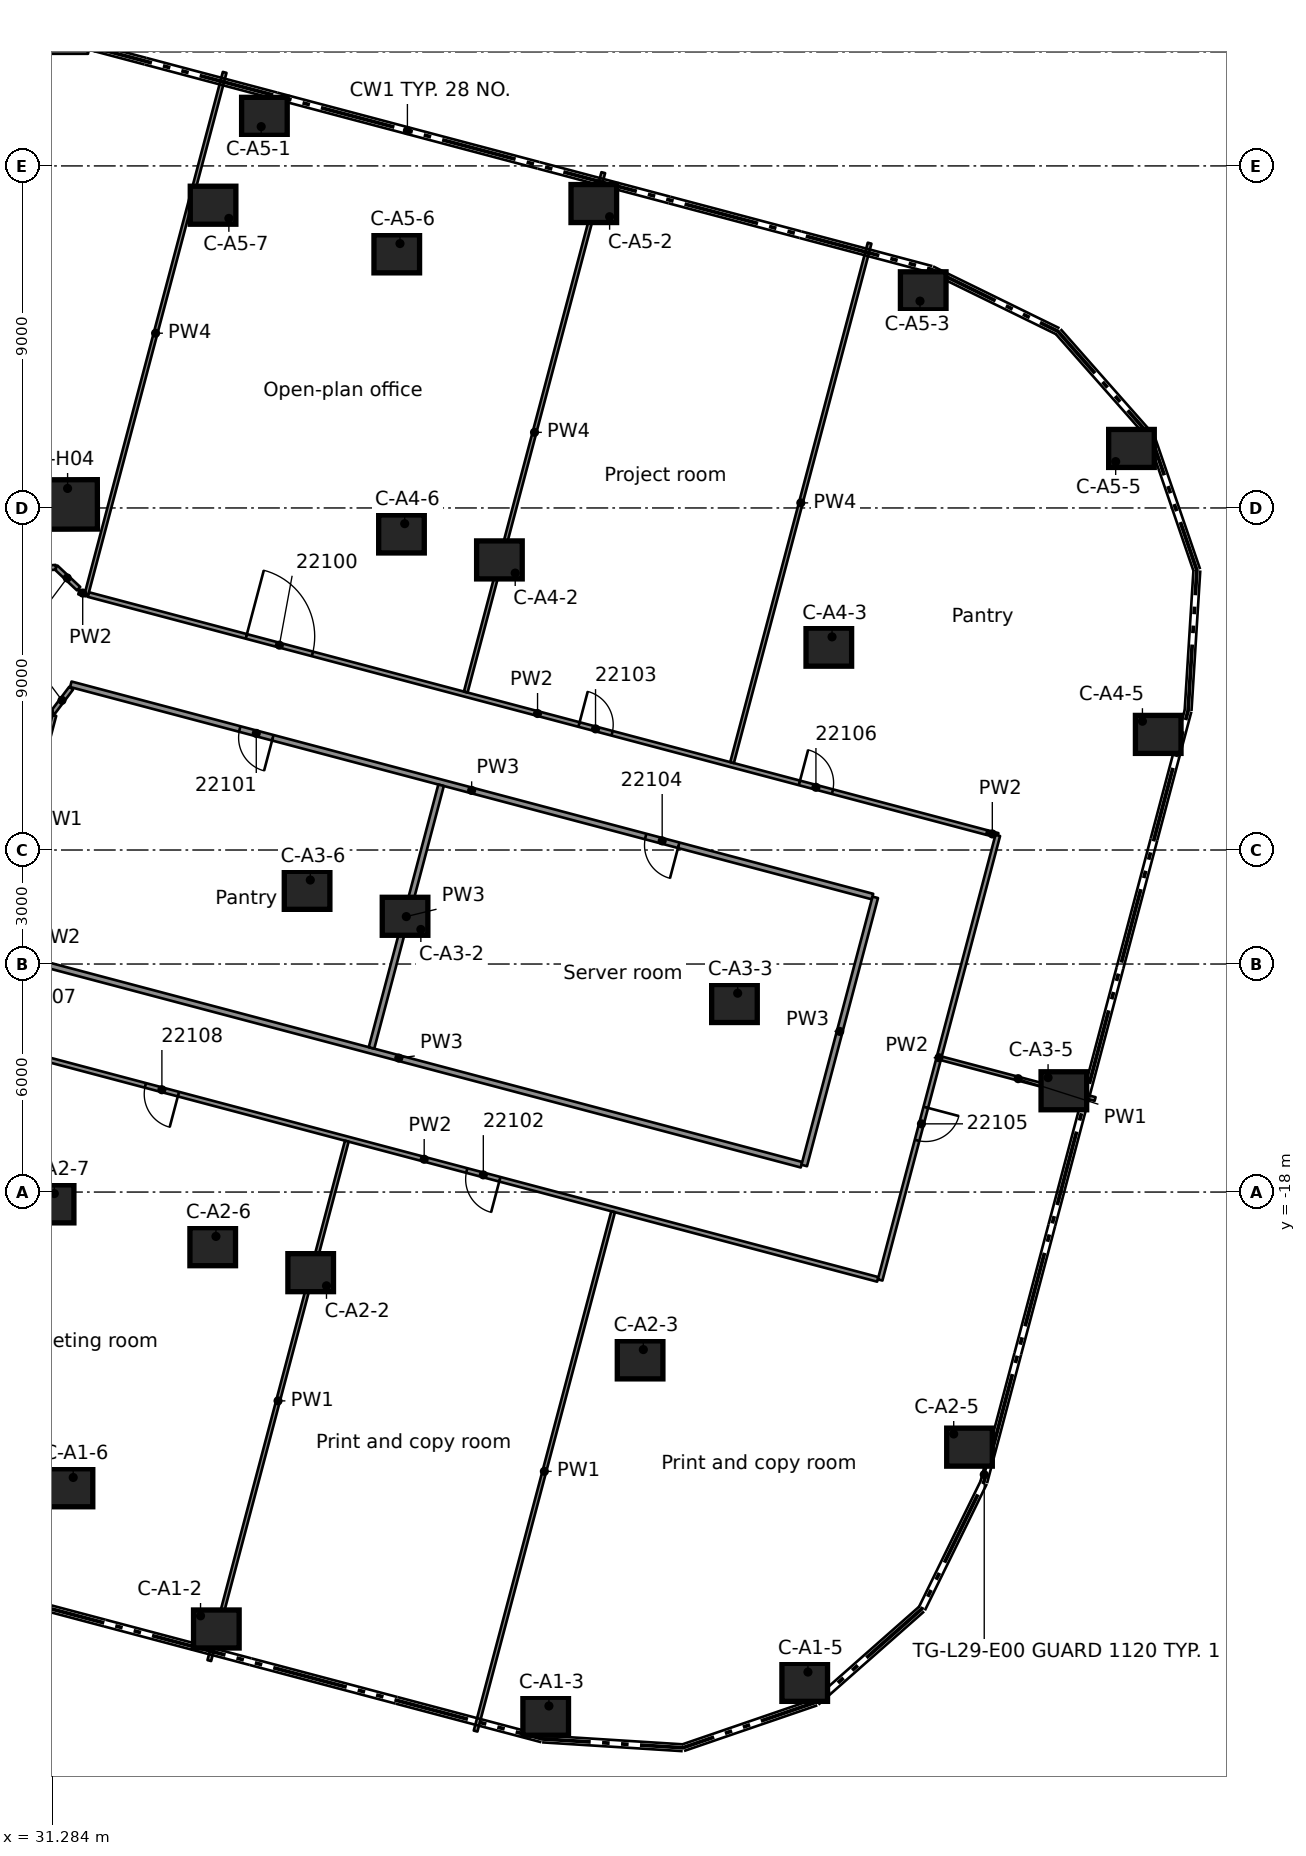
"""IFC4 building model, lengths in metres.
Left out: names, types, materials, properties, quantities, classifications, styles, units other than length and angle.
Written with IfcOpenShell. Run it as: python <this file> out.ifc"""

import sys

from ifc_helpers import new_model, si_unit, direction, frame, frame_2d, origin, origin_2d, place, context, subcontext, project, spatial, rectangle, extrude, element, fill, save


model = new_model("IFC4")
c1 = context("Model", 3, precision=1e-05, world=origin(), true_north=direction((0.0, 1.0)))
c2 = subcontext(c1, "Body", "Model", "MODEL_VIEW")
j1 = project(units=[si_unit("LENGTHUNIT", "METRE"), si_unit("PLANEANGLEUNIT", "RADIAN")], contexts=[c1])
p1 = place(None, origin())
s1 = spatial("IfcSite", under=j1, at=p1, CompositionType="ELEMENT")
p2 = place(p1, origin())
s2 = spatial("IfcBuilding", under=s1, at=p2, CompositionType="ELEMENT")
p3 = place(p2, frame((0.0, 0.0, 116.2)))
s3 = spatial("IfcBuildingStorey", under=s2, at=p3, CompositionType="ELEMENT", Elevation=116.2)
for number, where, z_axis, x_axis in (
    (1, (35.602, -29.497, 0.0), (0.0, 0.0, 1.0), (1.0, 0.0, 0.0)),
    (2, (44.269, -31.793, 0.0), (0.0, 0.0, 1.0), (1.0, 0.0, 0.0)),
    (3, (51.085, -30.901, 0.0), (0.0, 0.0, 1.0), (1.0, 0.0, 0.0)),
    (4, (31.751, -25.781, 0.0), (0.0, 0.0, 1.0), (1.0, 0.0, 0.0)),
    (5, (38.085, -20.121, 0.0), (0.0, 0.0, 1.0), (1.0, 0.0, 0.0)),
    (6, (46.753, -22.416, 0.0), (0.0, 0.0, 1.0), (1.0, 0.0, 0.0)),
    (7, (55.421, -24.712, 0.0), (0.0, 0.0, 1.0), (1.0, 0.0, 0.0)),
    (8, (35.507, -19.438, 0.0), (0.0, 0.0, 1.0), (1.0, 0.0, 0.0)),
    (9, (31.254, -18.311, 0.0), (0.0, 0.0, 1.0), (1.0, 0.0, 0.0)),
    (10, (40.568, -10.744, 0.0), (0.0, 0.0, 1.0), (1.0, 0.0, 0.0)),
    (11, (49.236, -13.039, 0.0), (0.0, 0.0, 1.0), (1.0, 0.0, 0.0)),
    (12, (57.904, -15.335, 0.0), (0.0, 0.0, 1.0), (1.0, 0.0, 0.0)),
    (13, (37.99, -10.061, 0.0), (0.0, 0.0, 1.0), (1.0, 0.0, 0.0)),
    (14, (43.051, -1.367, 0.0), (0.0, 0.0, 1.0), (1.0, 0.0, 0.0)),
    (15, (51.719, -3.663, 0.0), (0.0, 0.0, 1.0), (1.0, 0.0, 0.0)),
    (16, (60.387, -5.958, 0.0), (0.0, 0.0, 1.0), (1.0, 0.0, 0.0)),
    (17, (40.474, -0.684, 0.0), (0.0, 0.0, 1.0), (1.0, 0.0, 0.0)),
    (18, (36.867, 10.305, 0.0), (0.0, 0.0, 1.0), (1.0, 0.0, 0.0)),
    (19, (45.535, 8.01, 0.0), (0.0, 0.0, 1.0), (1.0, 0.0, 0.0)),
    (20, (54.203, 5.714, 0.0), (0.0, 0.0, 1.0), (1.0, 0.0, 0.0)),
    (21, (59.683, 1.566, 0.0), (0.0, 0.0, 1.0), (1.0, 0.0, 0.0)),
    (22, (40.35, 6.686, 0.0), (0.0, 0.0, 1.0), (1.0, 0.0, 0.0)),
    (23, (35.516, 7.966, 0.0), (0.0, 0.0, 1.0), (1.0, 0.0, 0.0)),
):
    element("IfcColumn", number, at=place(p3, frame(where, z_axis=z_axis, x_axis=x_axis)), inside=s3, PredefinedType="COLUMN", context=c2, shape_type="SweptSolid", body=[
        extrude(rectangle(XDim=1.2, YDim=1.0, at=origin_2d()), origin(), (0.0, 0.0, 1.0), 3.5),
    ])
p4 = place(p3, frame((31.822, 0.093, 0.0), z_axis=(0.0, 0.0, 1.0), x_axis=(0.999995752265, 0.002914695724, 0.0)))
e24 = element("IfcColumn", 24, at=p4, inside=s3, PredefinedType="COLUMN", context=c2, shape_type="SweptSolid", body=[
    extrude(rectangle(XDim=1.3, YDim=1.3, at=origin_2d()), origin(), (0.0, 0.0, 1.0), 3.5),
])
p5 = place(p3, frame((31.782, -4.741, 0.0), z_axis=(0.0, 0.0, 1.0), x_axis=(-0.601653415527, -0.798757264496, 0.0)))
e25 = element("IfcWall", 25, at=p5, inside=s3, PredefinedType="PARTITIONING", context=c2, shape_type="SweptSolid", body=[
    extrude(rectangle(XDim=0.803, YDim=0.125, at=frame_2d((0.401, 0.0))), origin(), (0.0, 0.0, 1.0), 3.08),
])
p6 = place(p3, frame((31.378, -1.56, 0.0), z_axis=(0.0, 0.0, 1.0), x_axis=(0.728704597213, -0.684828160928, 0.0)))
e26 = element("IfcWall", 26, at=p6, inside=s3, PredefinedType="PARTITIONING", context=c2, shape_type="SweptSolid", body=[
    extrude(rectangle(XDim=0.823, YDim=0.125, at=frame_2d((0.412, 0.0))), origin(), (0.0, 0.0, 1.0), 3.08),
])
p7 = place(p3, frame((55.876, -8.539, 0.0), z_axis=(0.0, 0.0, 1.0), x_axis=(0.966598588757, -0.256295080352, 0.0)))
e27 = element("IfcWall", 27, at=p7, inside=s3, PredefinedType="PARTITIONING", context=c2, shape_type="SweptSolid", body=[
    extrude(rectangle(XDim=0.3, YDim=0.125, at=frame_2d((0.15, 0.0))), origin(), (0.0, 0.0, 1.0), 3.08),
])
p8 = place(p3, frame((53.007, -20.298, 0.0), z_axis=(0.0, 0.0, 1.0), x_axis=(-0.966663351112, 0.256050709074, 0.0)))
e28 = element("IfcWall", 28, at=p8, inside=s3, PredefinedType="PARTITIONING", context=c2, shape_type="SweptSolid", body=[
    extrude(rectangle(XDim=24.694, YDim=0.125, at=frame_2d((12.347, 0.0))), origin(), (0.0, 0.0, 1.0), 3.08),
])
p9 = place(p8, frame((10.288, 0.0, 0.0)))
e29 = element("IfcOpeningElement", 29, at=p9, cuts=e28, PredefinedType="OPENING", context=c2, shape_type="SweptSolid", body=[
    extrude(rectangle(XDim=0.9, YDim=2.1, at=frame_2d((0.45, 1.05))), frame((0.0, 0.073, 0.0), z_axis=(0.0, -1.0, 0.0), x_axis=(1.0, 0.0, 0.0)), (0.0, 0.0, 1.0), 0.145),
])
p10 = place(p8, frame((23.037, 0.0, 0.0)))
e30 = element("IfcOpeningElement", 30, at=p10, cuts=e28, PredefinedType="OPENING", context=c2, shape_type="SweptSolid", body=[
    extrude(rectangle(XDim=0.9, YDim=2.1, at=frame_2d((0.45, 1.05))), frame((0.0, 0.073, 0.0), z_axis=(0.0, -1.0, 0.0), x_axis=(1.0, 0.0, 0.0)), (0.0, 0.0, 1.0), 0.145),
])
p11 = place(p8, frame((19.037, 0.0, 0.0)))
e31 = element("IfcOpeningElement", 31, at=p11, cuts=e28, PredefinedType="OPENING", context=c2, shape_type="SweptSolid", body=[
    extrude(rectangle(XDim=0.9, YDim=2.1, at=frame_2d((0.45, 1.05))), frame((0.0, 0.073, 0.0), z_axis=(0.0, -1.0, 0.0), x_axis=(1.0, 0.0, 0.0)), (0.0, 0.0, 1.0), 0.145),
])
p12 = place(p3, frame((29.806, -11.669, 0.0), z_axis=(0.0, 0.0, 1.0), x_axis=(0.966684240893, -0.255971831282, 0.0)))
e32 = element("IfcWall", 32, at=p12, inside=s3, PredefinedType="PARTITIONING", context=c2, shape_type="SweptSolid", body=[
    extrude(rectangle(XDim=21.925, YDim=0.15, at=frame_2d((10.962, 0.0))), origin(), (0.0, 0.0, 1.0), 3.08),
])
p13 = place(p3, frame((54.677, -14.481, 0.0), z_axis=(0.0, 0.0, 1.0), x_axis=(0.966750591727, -0.255721124263, 0.0)))
e33 = element("IfcWall", 33, at=p13, inside=s3, PredefinedType="PARTITIONING", context=c2, shape_type="SweptSolid", body=[
    extrude(rectangle(XDim=4.188, YDim=0.1, at=frame_2d((2.094, 0.0))), origin(), (0.0, 0.0, 1.0), 3.08),
])
p14 = place(p3, frame((52.868, -10.225, 0.0), z_axis=(0.0, 0.0, 1.0), x_axis=(-0.966680071038, 0.255987578328, 0.0)))
e34 = element("IfcWall", 34, at=p14, inside=s3, PredefinedType="PARTITIONING", context=c2, shape_type="SweptSolid", body=[
    extrude(rectangle(XDim=21.822, YDim=0.15, at=frame_2d((10.911, 0.0))), origin(), (0.0, 0.0, 1.0), 3.08),
])
p15 = place(p14, frame((16.324, 0.0, 0.0)))
e35 = element("IfcOpeningElement", 35, at=p15, cuts=e34, PredefinedType="OPENING", context=c2, shape_type="SweptSolid", body=[
    extrude(rectangle(XDim=0.9, YDim=2.1, at=frame_2d((0.45, 1.05))), frame((0.0, 0.085, 0.0), z_axis=(0.0, -1.0, 0.0), x_axis=(1.0, 0.0, 0.0)), (0.0, 0.0, 1.0), 0.17),
])
p16 = place(p14, frame((5.275, 0.0, 0.0)))
e36 = element("IfcOpeningElement", 36, at=p16, cuts=e34, PredefinedType="OPENING", context=c2, shape_type="SweptSolid", body=[
    extrude(rectangle(XDim=0.9, YDim=2.1, at=frame_2d((0.45, 1.05))), frame((0.0, 0.085, 0.0), z_axis=(0.0, -1.0, 0.0), x_axis=(1.0, 0.0, 0.0)), (0.0, 0.0, 1.0), 0.17),
])
p17 = place(p3, frame((31.985, -2.212, 0.0), z_axis=(0.0, 0.0, 1.0), x_axis=(0.966952674041, -0.25495592985, 0.0)))
e37 = element("IfcWall", 37, at=p17, inside=s3, PredefinedType="PARTITIONING", context=c2, shape_type="SweptSolid", body=[
    extrude(rectangle(XDim=0.208, YDim=0.125, at=frame_2d((0.104, 0.0))), origin(), (0.0, 0.0, 1.0), 3.08),
])
p18 = place(p3, frame((32.234, -2.278, 0.0), z_axis=(0.0, 0.0, 1.0), x_axis=(0.966664542412, -0.256046211541, 0.0)))
e38 = element("IfcWall", 38, at=p18, inside=s3, PredefinedType="PARTITIONING", context=c2, shape_type="SweptSolid", body=[
    extrude(rectangle(XDim=24.456, YDim=0.125, at=frame_2d((12.228, 0.0))), origin(), (0.0, 0.0, 1.0), 3.08),
])
p19 = place(p18, frame((4.3, 0.0, 0.0)))
e39 = element("IfcOpeningElement", 39, at=p19, cuts=e38, PredefinedType="OPENING", context=c2, shape_type="SweptSolid", body=[
    extrude(rectangle(XDim=1.8, YDim=2.1, at=frame_2d((0.9, 1.05))), frame((0.0, 0.073, 0.0), z_axis=(0.0, -1.0, 0.0), x_axis=(1.0, 0.0, 0.0)), (0.0, 0.0, 1.0), 0.145),
])
p20 = place(p18, frame((13.357, 0.0, 0.0)))
e40 = element("IfcOpeningElement", 40, at=p20, cuts=e38, PredefinedType="OPENING", context=c2, shape_type="SweptSolid", body=[
    extrude(rectangle(XDim=0.9, YDim=2.1, at=frame_2d((0.45, 1.05))), frame((0.0, 0.073, 0.0), z_axis=(0.0, -1.0, 0.0), x_axis=(1.0, 0.0, 0.0)), (0.0, 0.0, 1.0), 0.145),
])
p21 = place(p18, frame((19.356, 0.0, 0.0)))
e41 = element("IfcOpeningElement", 41, at=p21, cuts=e38, PredefinedType="OPENING", context=c2, shape_type="SweptSolid", body=[
    extrude(rectangle(XDim=0.9, YDim=2.1, at=frame_2d((0.45, 1.05))), frame((0.0, 0.073, 0.0), z_axis=(0.0, -1.0, 0.0), x_axis=(1.0, 0.0, 0.0)), (0.0, 0.0, 1.0), 0.145),
])
p22 = place(p3, frame((22.713, 12.0, 0.0), z_axis=(0.0, 0.0, 1.0), x_axis=(1.0, 0.0, 0.0)))
e42 = element("IfcWall", 42, at=p22, inside=s3, PredefinedType="PARTITIONING", context=c2, shape_type="SweptSolid", body=[
    extrude(rectangle(XDim=9.513, YDim=0.1, at=frame_2d((4.757, 0.0))), origin(), (0.0, 0.0, 1.0), 3.08),
])
p23 = place(p3, frame((22.713, -6.111, 0.0), z_axis=(0.0, 0.0, 1.0), x_axis=(0.996414999207, 0.084599937093, 0.0)))
e43 = element("IfcWall", 43, at=p23, inside=s3, PredefinedType="PARTITIONING", context=c2, shape_type="SweptSolid", body=[
    extrude(rectangle(XDim=8.617, YDim=0.125, at=frame_2d((4.309, 0.0))), origin(), (0.0, 0.0, 1.0), 3.08),
])
p24 = place(p3, frame((25.223, -2.083, 0.0), z_axis=(0.0, 0.0, 1.0), x_axis=(0.996410075985, 0.084657902612, 0.0)))
e44 = element("IfcWall", 44, at=p24, inside=s3, PredefinedType="PARTITIONING", context=c2, shape_type="SweptSolid", body=[
    extrude(rectangle(XDim=6.177, YDim=0.125, at=frame_2d((3.089, 0.0))), origin(), (0.0, 0.0, 1.0), 3.08),
])
p25 = place(p3, frame((56.165, -8.616, 0.0), z_axis=(0.0, 0.0, 1.0), x_axis=(-0.255867603739, -0.966711833669, 0.0)))
e45 = element("IfcWall", 45, at=p25, inside=s3, PredefinedType="PARTITIONING", context=c2, shape_type="SweptSolid", body=[
    extrude(rectangle(XDim=12.1, YDim=0.125, at=frame_2d((6.05, 0.0))), origin(), (0.0, 0.0, 1.0), 3.08),
])
p26 = place(p25, frame((7.401, 0.0, 0.0)))
e46 = element("IfcOpeningElement", 46, at=p26, cuts=e45, PredefinedType="OPENING", context=c2, shape_type="SweptSolid", body=[
    extrude(rectangle(XDim=0.9, YDim=2.1, at=frame_2d((0.45, 1.05))), frame((0.0, 0.073, 0.0), z_axis=(0.0, -1.0, 0.0), x_axis=(1.0, 0.0, 0.0)), (0.0, 0.0, 1.0), 0.145),
])
p27 = place(p3, frame((51.072, -17.301, 0.0), z_axis=(0.0, 0.0, 1.0), x_axis=(0.256040569916, 0.966666036725, 0.0)))
e47 = element("IfcWall", 47, at=p27, inside=s3, PredefinedType="PARTITIONING", context=c2, shape_type="SweptSolid", body=[
    extrude(rectangle(XDim=7.299, YDim=0.15, at=frame_2d((3.65, 0.0))), origin(), (0.0, 0.0, 1.0), 3.08),
])
p28 = place(p3, frame((42.424, -32.183, 0.0), z_axis=(0.0, 0.0, 1.0), x_axis=(0.255986543434, 0.966680345089, 0.0)))
e48 = element("IfcWall", 48, at=p28, inside=s3, PredefinedType="PARTITIONING", context=c2, shape_type="SweptSolid", body=[
    extrude(rectangle(XDim=14.137, YDim=0.1, at=frame_2d((7.068, 0.0))), origin(), (0.0, 0.0, 1.0), 3.08),
])
p29 = place(p3, frame((49.173, -6.7, 0.0), z_axis=(0.0, 0.0, 1.0), x_axis=(0.25596945064, 0.966684871268, 0.0)))
e49 = element("IfcWall", 49, at=p29, inside=s3, PredefinedType="PARTITIONING", context=c2, shape_type="SweptSolid", body=[
    extrude(rectangle(XDim=14.138, YDim=0.1, at=frame_2d((7.069, 0.0))), origin(), (0.0, 0.0, 1.0), 2.445),
])
p30 = place(p3, frame((35.417, -30.328, 0.0), z_axis=(0.0, 0.0, 1.0), x_axis=(0.255904901066, 0.966701961108, 0.0)))
e50 = element("IfcWall", 50, at=p30, inside=s3, PredefinedType="PARTITIONING", context=c2, shape_type="SweptSolid", body=[
    extrude(rectangle(XDim=14.138, YDim=0.1, at=frame_2d((7.069, 0.0))), origin(), (0.0, 0.0, 1.0), 3.08),
])
p31 = place(p3, frame((39.685, -14.208, 0.0), z_axis=(0.0, 0.0, 1.0), x_axis=(0.256072738338, 0.966657515711, 0.0)))
e51 = element("IfcWall", 51, at=p31, inside=s3, PredefinedType="PARTITIONING", context=c2, shape_type="SweptSolid", body=[
    extrude(rectangle(XDim=7.151, YDim=0.15, at=frame_2d((3.575, 0.0))), origin(), (0.0, 0.0, 1.0), 3.08),
])
p32 = place(p3, frame((42.165, -4.844, 0.0), z_axis=(0.0, 0.0, 1.0), x_axis=(0.25596945064, 0.966684871268, 0.0)))
e52 = element("IfcWall", 52, at=p32, inside=s3, PredefinedType="PARTITIONING", context=c2, shape_type="SweptSolid", body=[
    extrude(rectangle(XDim=14.138, YDim=0.1, at=frame_2d((7.069, 0.0))), origin(), (0.0, 0.0, 1.0), 2.445),
])
p33 = place(p3, frame((29.883, -10.96, 0.0), z_axis=(0.0, 0.0, 1.0), x_axis=(0.255996310915, 0.96667775851, 0.0)))
e53 = element("IfcWall", 53, at=p33, inside=s3, PredefinedType="PARTITIONING", context=c2, shape_type="SweptSolid", body=[
    extrude(rectangle(XDim=5.692, YDim=0.1, at=frame_2d((2.846, 0.0))), origin(), (0.0, 0.0, 1.0), 3.08),
])
p34 = place(p3, frame((32.186, -2.265, 0.0), z_axis=(0.0, 0.0, 1.0), x_axis=(0.2560045642, 0.966675572831, 0.0)))
e54 = element("IfcWall", 54, at=p34, inside=s3, PredefinedType="PARTITIONING", context=c2, shape_type="SweptSolid", body=[
    extrude(rectangle(XDim=14.199, YDim=0.1, at=frame_2d((7.1, 0.0))), origin(), (0.0, 0.0, 1.0), 2.445),
])
p35 = place(p19, origin())
e55 = element("IfcDoor", 55, at=p35, inside=s3, OperationType="DOUBLE_DOOR_SINGLE_SWING", PredefinedType="DOOR", context=c2, shape_type="SweptSolid", body=[
    extrude(rectangle(XDim=1.8, YDim=2.1, at=frame_2d((0.9, 1.05))), frame((0.0, 0.025, 0.0), z_axis=(0.0, -1.0, 0.0), x_axis=(1.0, 0.0, 0.0)), (0.0, 0.0, 1.0), 0.05),
])
fill(e39, e55)
p36 = place(p15, origin())
e56 = element("IfcDoor", 56, at=p36, inside=s3, OperationType="SINGLE_SWING_RIGHT", PredefinedType="DOOR", context=c2, shape_type="SweptSolid", body=[
    extrude(rectangle(XDim=0.9, YDim=2.1, at=frame_2d((0.45, 1.05))), frame((0.0, 0.025, 0.0), z_axis=(0.0, -1.0, 0.0), x_axis=(1.0, 0.0, 0.0)), (0.0, 0.0, 1.0), 0.05),
])
fill(e35, e56)
p37 = place(p9, origin())
e57 = element("IfcDoor", 57, at=p37, inside=s3, OperationType="SINGLE_SWING_LEFT", PredefinedType="DOOR", context=c2, shape_type="SweptSolid", body=[
    extrude(rectangle(XDim=0.9, YDim=2.1, at=frame_2d((0.45, 1.05))), frame((0.0, 0.025, 0.0), z_axis=(0.0, -1.0, 0.0), x_axis=(1.0, 0.0, 0.0)), (0.0, 0.0, 1.0), 0.05),
])
fill(e29, e57)
p38 = place(p20, origin())
e58 = element("IfcDoor", 58, at=p38, inside=s3, OperationType="SINGLE_SWING_RIGHT", PredefinedType="DOOR", context=c2, shape_type="SweptSolid", body=[
    extrude(rectangle(XDim=0.9, YDim=2.1, at=frame_2d((0.45, 1.05))), frame((0.0, 0.025, 0.0), z_axis=(0.0, -1.0, 0.0), x_axis=(1.0, 0.0, 0.0)), (0.0, 0.0, 1.0), 0.05),
])
fill(e40, e58)
p39 = place(p16, origin())
e59 = element("IfcDoor", 59, at=p39, inside=s3, OperationType="SINGLE_SWING_LEFT", PredefinedType="DOOR", context=c2, shape_type="SweptSolid", body=[
    extrude(rectangle(XDim=0.9, YDim=2.1, at=frame_2d((0.45, 1.05))), frame((0.0, 0.025, 0.0), z_axis=(0.0, -1.0, 0.0), x_axis=(1.0, 0.0, 0.0)), (0.0, 0.0, 1.0), 0.05),
])
fill(e36, e59)
p40 = place(p26, origin())
e60 = element("IfcDoor", 60, at=p40, inside=s3, OperationType="SINGLE_SWING_RIGHT", PredefinedType="DOOR", context=c2, shape_type="SweptSolid", body=[
    extrude(rectangle(XDim=0.9, YDim=2.1, at=frame_2d((0.45, 1.05))), frame((0.0, 0.025, 0.0), z_axis=(0.0, -1.0, 0.0), x_axis=(1.0, 0.0, 0.0)), (0.0, 0.0, 1.0), 0.05),
])
fill(e46, e60)
p41 = place(p21, origin())
e61 = element("IfcDoor", 61, at=p41, inside=s3, OperationType="SINGLE_SWING_RIGHT", PredefinedType="DOOR", context=c2, shape_type="SweptSolid", body=[
    extrude(rectangle(XDim=0.9, YDim=2.1, at=frame_2d((0.45, 1.05))), frame((0.0, 0.025, 0.0), z_axis=(0.0, -1.0, 0.0), x_axis=(1.0, 0.0, 0.0)), (0.0, 0.0, 1.0), 0.05),
])
fill(e41, e61)
p42 = place(p11, origin())
e62 = element("IfcDoor", 62, at=p42, inside=s3, OperationType="SINGLE_SWING_RIGHT", PredefinedType="DOOR", context=c2, shape_type="SweptSolid", body=[
    extrude(rectangle(XDim=0.9, YDim=2.1, at=frame_2d((0.45, 1.05))), frame((0.0, 0.025, 0.0), z_axis=(0.0, -1.0, 0.0), x_axis=(1.0, 0.0, 0.0)), (0.0, 0.0, 1.0), 0.05),
])
fill(e31, e62)
save(model, sys.argv[1])
